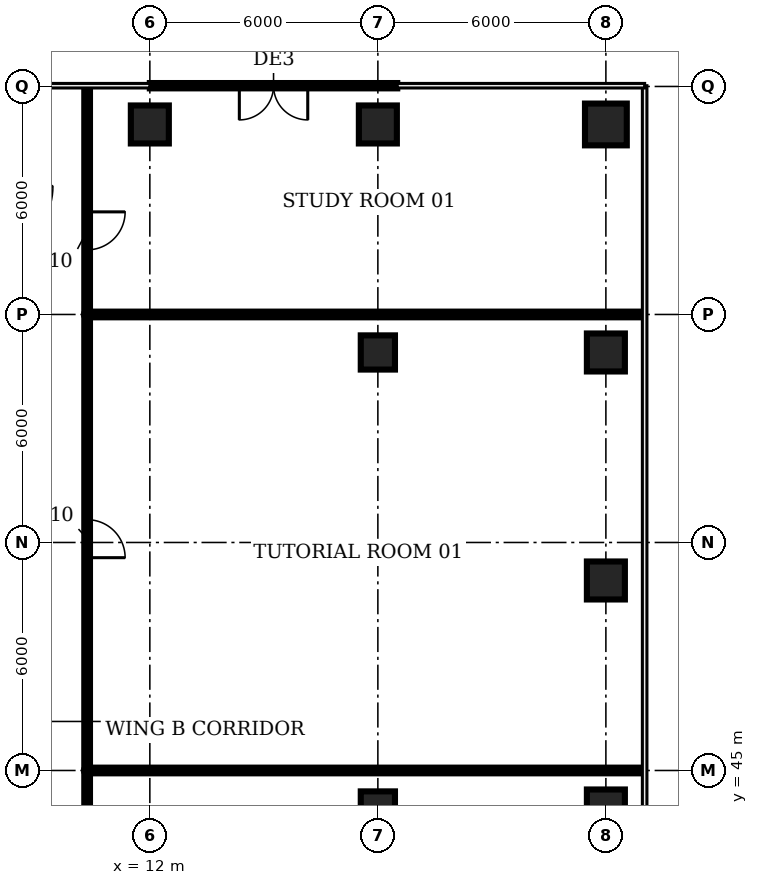
"""IFC4 building model, lengths in metres.
Left out: names, types, materials, properties, quantities, classifications, styles, units other than length and angle.
Written with IfcOpenShell. Run it as: python <this file> out.ifc"""

import sys

from ifc_helpers import new_model, si_unit, direction, frame, frame_2d, origin, origin_2d, place, context, subcontext, project, spatial, rectangle, circle, extrude, element, fill, save


model = new_model("IFC4")
c1 = context("Model", 3, precision=1e-05, world=origin(), true_north=direction((0.0, 1.0)))
c2 = subcontext(c1, "Body", "Model", "MODEL_VIEW")
j1 = project(units=[si_unit("LENGTHUNIT", "METRE"), si_unit("PLANEANGLEUNIT", "RADIAN")], contexts=[c1])
p1 = place(None, origin())
s1 = spatial("IfcSite", under=j1, at=p1, CompositionType="ELEMENT")
p2 = place(p1, origin())
s2 = spatial("IfcBuilding", under=s1, at=p2, CompositionType="ELEMENT")
p3 = place(p2, frame((0.0, 0.0, 11.0)))
s3 = spatial("IfcBuildingStorey", under=s2, at=p3, CompositionType="ELEMENT", Elevation=11.0)
p4 = place(p3, frame((12.0, 62.0, 0.0), z_axis=(0.0, 0.0, 1.0), x_axis=(1.0, 0.0, 0.0)))
e1 = element("IfcColumn", 1, at=p4, inside=s3, PredefinedType="COLUMN", context=c2, shape_type="SweptSolid", body=[
    extrude(rectangle(XDim=1.0, YDim=1.0, at=origin_2d()), origin(), (0.0, 0.0, 1.0), 4.15),
])
for number, where, z_axis, x_axis in (
    (2, (18.0, 44.0, 0.0), (0.0, 0.0, 1.0), (1.0, 0.0, 0.0)),
    (3, (18.0, 56.0, 0.0), (0.0, 0.0, 1.0), (1.0, 0.0, 0.0)),
):
    element("IfcColumn", number, at=place(p3, frame(where, z_axis=z_axis, x_axis=x_axis)), inside=s3, PredefinedType="COLUMN", context=c2, shape_type="SweptSolid", body=[
        extrude(rectangle(XDim=0.9, YDim=0.9, at=origin_2d()), origin(), (0.0, 0.0, 1.0), 4.15),
    ])
for number, where, z_axis, x_axis in (
    (4, (18.0, 62.0, 0.0), (0.0, 0.0, 1.0), (1.0, 0.0, 0.0)),
    (5, (24.0, 44.0, 0.0), (0.0, 0.0, 1.0), (1.0, 0.0, 0.0)),
    (6, (24.0, 50.0, 0.0), (0.0, 0.0, 1.0), (1.0, 0.0, 0.0)),
    (7, (24.0, 56.0, 0.0), (0.0, 0.0, 1.0), (1.0, 0.0, 0.0)),
):
    element("IfcColumn", number, at=place(p3, frame(where, z_axis=z_axis, x_axis=x_axis)), inside=s3, PredefinedType="COLUMN", context=c2, shape_type="SweptSolid", body=[
        extrude(rectangle(XDim=1.0, YDim=1.0, at=origin_2d()), origin(), (0.0, 0.0, 1.0), 4.15),
    ])
p5 = place(p3, frame((24.0, 62.0, 0.0), z_axis=(0.0, 0.0, 1.0), x_axis=(1.0, 0.0, 0.0)))
e8 = element("IfcColumn", 8, at=p5, inside=s3, PredefinedType="COLUMN", context=c2, shape_type="SweptSolid", body=[
    extrude(circle(Radius=0.55, at=origin_2d()), origin(), (0.0, 0.0, 1.0), 4.15),
])
p6 = place(p3, frame((18.51, 63.02, 0.0), z_axis=(0.0, 0.0, 1.0), x_axis=(-1.0, 0.0, 0.0)))
e9 = element("IfcWall", 9, at=p6, inside=s3, PredefinedType="SOLIDWALL", context=c2, shape_type="SweptSolid", body=[
    extrude(rectangle(XDim=6.51, YDim=0.14, at=frame_2d((3.255, 0.0))), origin(), (0.0, 0.0, 1.0), 4.15),
])
p7 = place(p6, frame((2.355, 0.0, 0.0)))
e10 = element("IfcOpeningElement", 10, at=p7, cuts=e9, PredefinedType="OPENING", context=c2, shape_type="SweptSolid", body=[
    extrude(rectangle(XDim=1.8, YDim=2.4, at=frame_2d((0.9, 1.2))), frame((0.0, 0.08, 0.0), z_axis=(0.0, -1.0, 0.0), x_axis=(1.0, 0.0, 0.0)), (0.0, 0.0, 1.0), 0.16),
])
p8 = place(p3, frame((10.35, 45.0, 0.0), z_axis=(0.0, 0.0, 1.0), x_axis=(0.0, -1.0, 0.0)))
e11 = element("IfcWall", 11, at=p8, inside=s3, PredefinedType="PARTITIONING", context=c2, shape_type="SweptSolid", body=[
    extrude(rectangle(XDim=6.0, YDim=0.15, at=frame_2d((3.0, 0.0))), origin(), (0.0, 0.0, 1.0), 3.08),
])
p9 = place(p8, frame((2.4, 0.0, 0.0)))
e12 = element("IfcOpeningElement", 12, at=p9, cuts=e11, PredefinedType="OPENING", context=c2, shape_type="SweptSolid", body=[
    extrude(rectangle(XDim=1.0, YDim=2.1, at=frame_2d((0.5, 1.05))), frame((0.0, 0.085, 0.0), z_axis=(0.0, -1.0, 0.0), x_axis=(1.0, 0.0, 0.0)), (0.0, 0.0, 1.0), 0.17),
])
p10 = place(p3, frame((10.35, 45.0, 0.0), z_axis=(0.0, 0.0, 1.0), x_axis=(1.0, 0.0, 0.0)))
e13 = element("IfcWall", 13, at=p10, inside=s3, PredefinedType="PARTITIONING", context=c2, shape_type="SweptSolid", body=[
    extrude(rectangle(XDim=14.62, YDim=0.15, at=frame_2d((7.31, 0.0))), origin(), (0.0, 0.0, 1.0), 3.08),
])
p11 = place(p3, frame((10.35, 57.0, 0.0), z_axis=(0.0, 0.0, 1.0), x_axis=(0.0, -1.0, 0.0)))
e14 = element("IfcWall", 14, at=p11, inside=s3, PredefinedType="PARTITIONING", context=c2, shape_type="SweptSolid", body=[
    extrude(rectangle(XDim=12.0, YDim=0.15, at=frame_2d((6.0, 0.0))), origin(), (0.0, 0.0, 1.0), 3.08),
])
p12 = place(p11, frame((5.4, 0.0, 0.0)))
e15 = element("IfcOpeningElement", 15, at=p12, cuts=e14, PredefinedType="OPENING", context=c2, shape_type="SweptSolid", body=[
    extrude(rectangle(XDim=1.0, YDim=2.1, at=frame_2d((0.5, 1.05))), frame((0.0, 0.085, 0.0), z_axis=(0.0, -1.0, 0.0), x_axis=(1.0, 0.0, 0.0)), (0.0, 0.0, 1.0), 0.17),
])
p13 = place(p3, frame((10.35, 57.0, 0.0), z_axis=(0.0, 0.0, 1.0), x_axis=(1.0, 0.0, 0.0)))
e16 = element("IfcWall", 16, at=p13, inside=s3, PredefinedType="PARTITIONING", context=c2, shape_type="SweptSolid", body=[
    extrude(rectangle(XDim=14.605, YDim=0.15, at=frame_2d((7.302, 0.0))), origin(), (0.0, 0.0, 1.0), 3.08),
])
p14 = place(p3, frame((10.35, 62.97, 0.0), z_axis=(0.0, 0.0, 1.0), x_axis=(0.0, -1.0, 0.0)))
e17 = element("IfcWall", 17, at=p14, inside=s3, PredefinedType="PARTITIONING", context=c2, shape_type="SweptSolid", body=[
    extrude(rectangle(XDim=5.97, YDim=0.15, at=frame_2d((2.985, 0.0))), origin(), (0.0, 0.0, 1.0), 3.08),
])
p15 = place(p14, frame((3.27, 0.0, 0.0)))
e18 = element("IfcOpeningElement", 18, at=p15, cuts=e17, PredefinedType="OPENING", context=c2, shape_type="SweptSolid", body=[
    extrude(rectangle(XDim=1.0, YDim=2.1, at=frame_2d((0.5, 1.05))), frame((0.0, 0.085, 0.0), z_axis=(0.0, -1.0, 0.0), x_axis=(1.0, 0.0, 0.0)), (0.0, 0.0, 1.0), 0.17),
])
p16 = place(p7, origin())
e19 = element("IfcDoor", 19, at=p16, inside=s3, OperationType="DOUBLE_DOOR_DOUBLE_SWING", PredefinedType="DOOR", context=c2, shape_type="SweptSolid", body=[
    extrude(rectangle(XDim=1.8, YDim=2.4, at=frame_2d((0.9, 1.2))), frame((0.0, 0.025, 0.0), z_axis=(0.0, -1.0, 0.0), x_axis=(1.0, 0.0, 0.0)), (0.0, 0.0, 1.0), 0.05),
])
fill(e10, e19)
p17 = place(p12, origin())
e20 = element("IfcDoor", 20, at=p17, inside=s3, OperationType="SINGLE_SWING_RIGHT", PredefinedType="DOOR", context=c2, shape_type="SweptSolid", body=[
    extrude(rectangle(XDim=1.0, YDim=2.1, at=frame_2d((0.5, 1.05))), frame((0.0, 0.025, 0.0), z_axis=(0.0, -1.0, 0.0), x_axis=(1.0, 0.0, 0.0)), (0.0, 0.0, 1.0), 0.05),
])
fill(e15, e20)
p18 = place(p15, origin())
e21 = element("IfcDoor", 21, at=p18, inside=s3, OperationType="SINGLE_SWING_LEFT", PredefinedType="DOOR", context=c2, shape_type="SweptSolid", body=[
    extrude(rectangle(XDim=1.0, YDim=2.1, at=frame_2d((0.5, 1.05))), frame((0.0, 0.025, 0.0), z_axis=(0.0, -1.0, 0.0), x_axis=(1.0, 0.0, 0.0)), (0.0, 0.0, 1.0), 0.05),
])
fill(e18, e21)
save(model, sys.argv[1])
